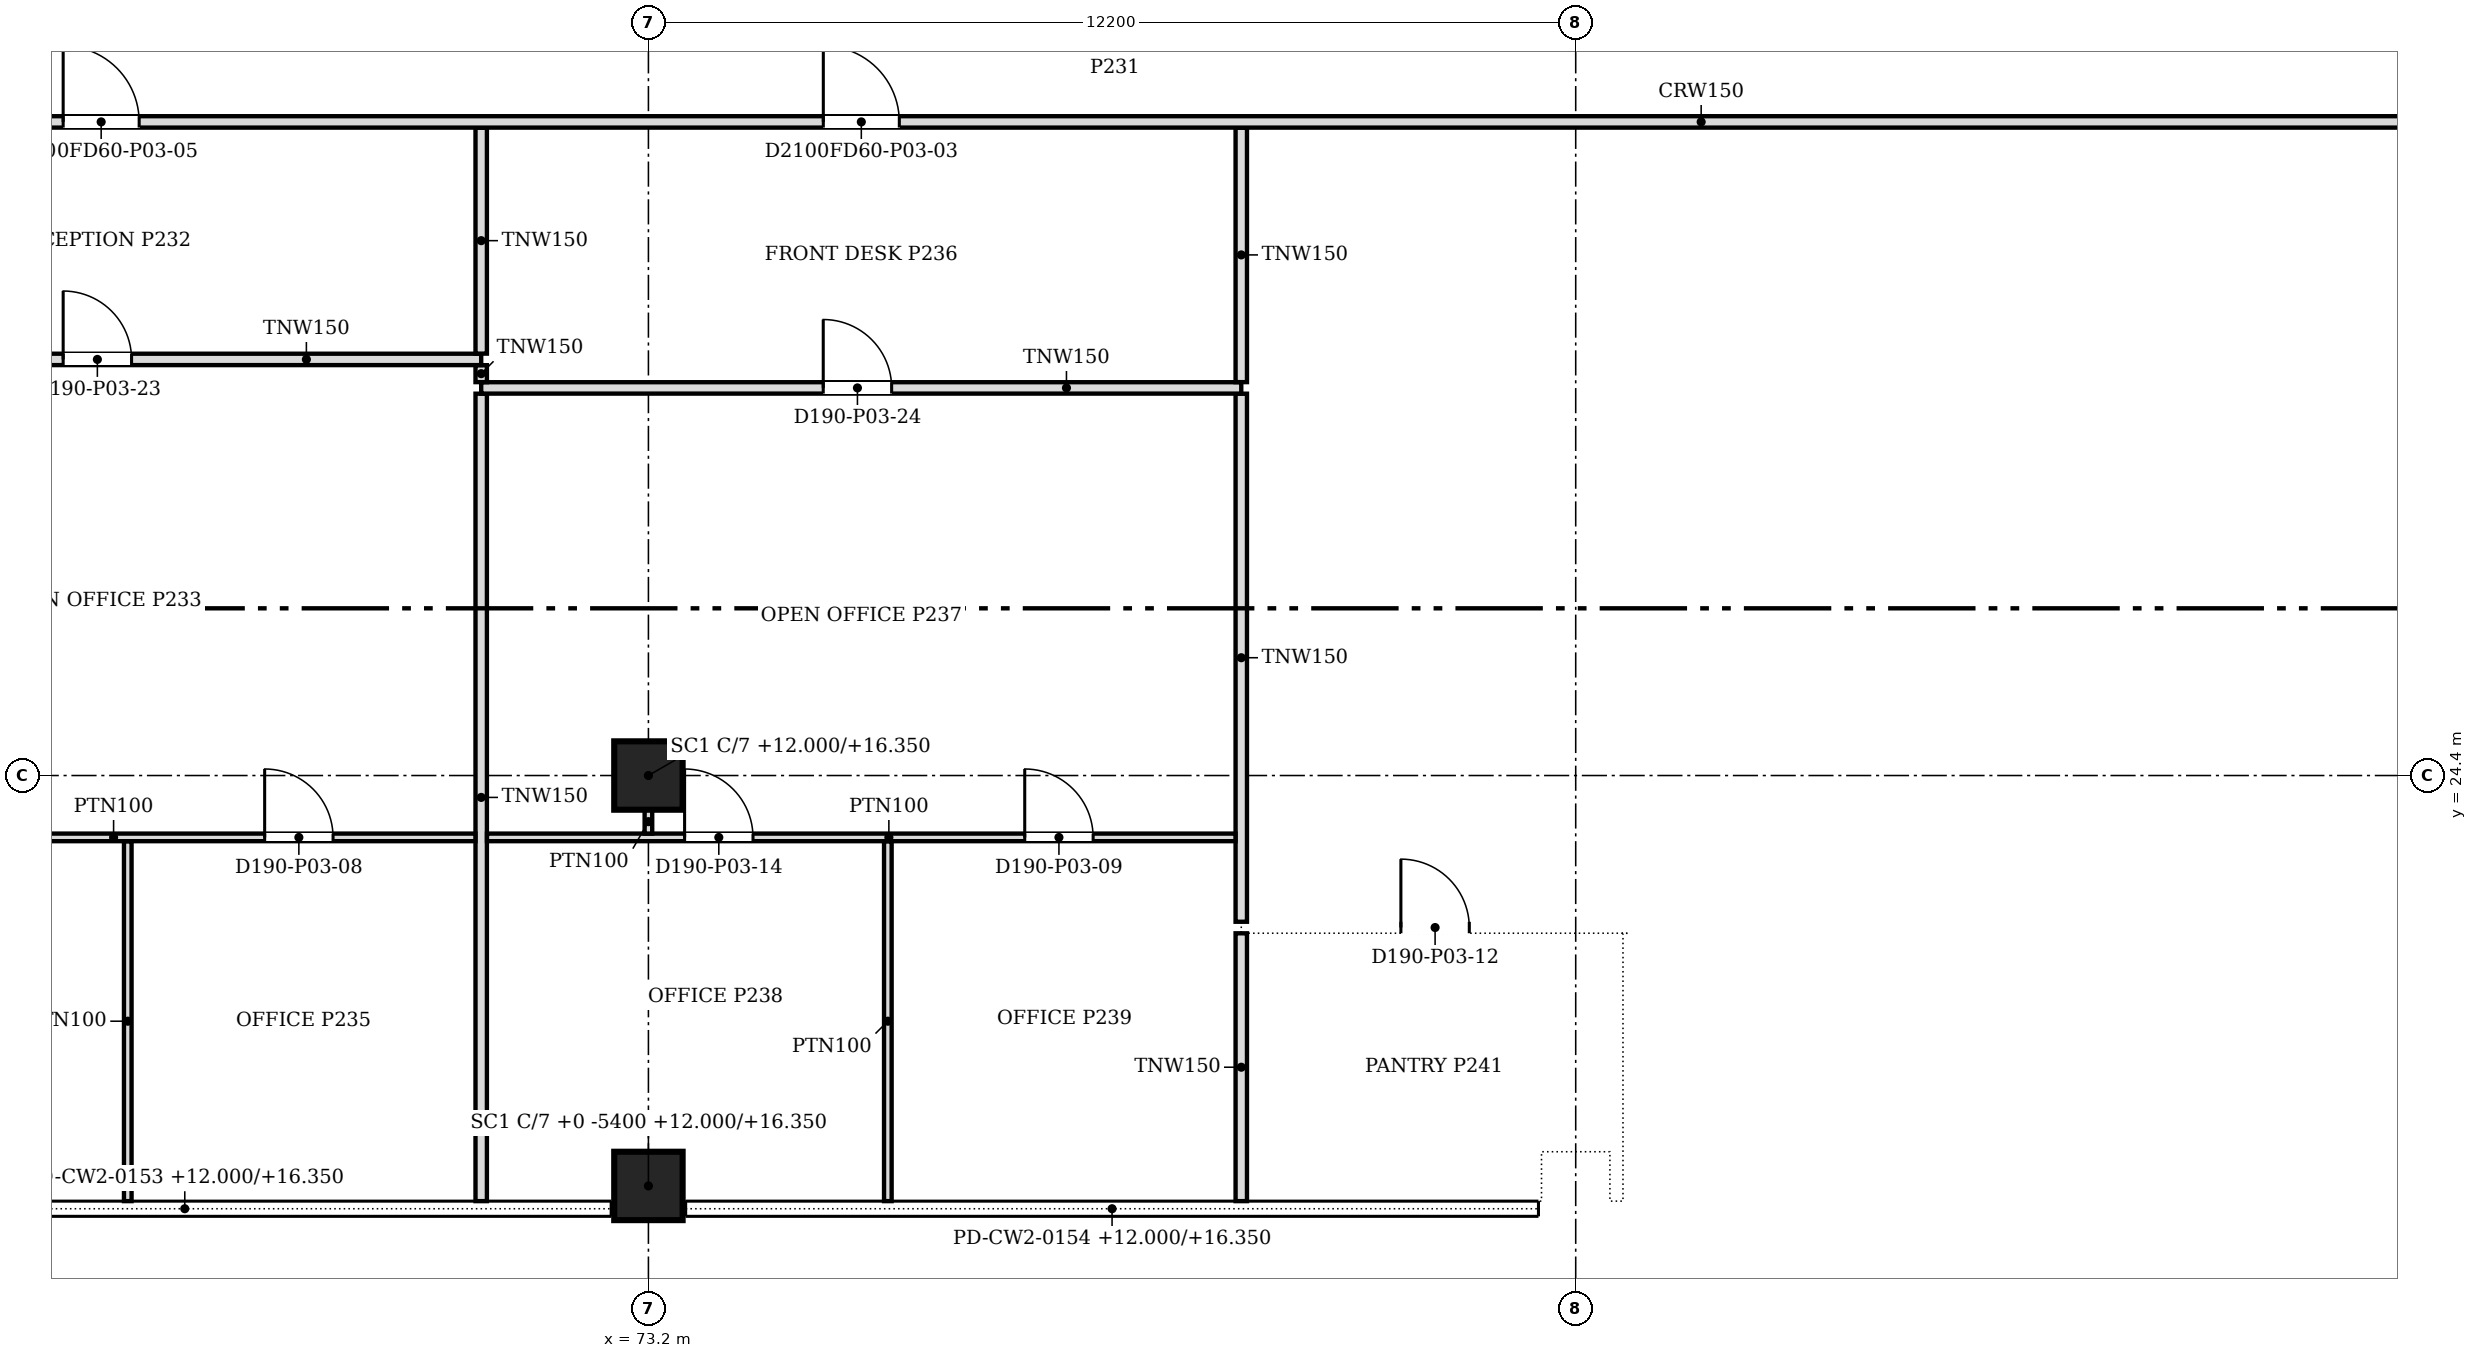
"""IFC4 building model, lengths in metres.
Left out: names, types, materials, properties, quantities, classifications, styles, units other than length and angle.
Written with IfcOpenShell. Run it as: python <this file> out.ifc"""

import sys

from ifc_helpers import new_model, si_unit, direction, frame, frame_2d, origin, origin_2d, place, context, subcontext, project, spatial, rectangle, extrude, source, transform, mapped, element, fill, save


model = new_model("IFC4")
c1 = context("Model", 3, precision=1e-05, world=origin(), true_north=direction((0.0, 1.0)))
c2 = subcontext(c1, "Body", "Model", "MODEL_VIEW")
j1 = project(units=[si_unit("LENGTHUNIT", "METRE"), si_unit("PLANEANGLEUNIT", "RADIAN")], contexts=[c1])
p1 = place(None, origin())
s1 = spatial("IfcSite", under=j1, at=p1, CompositionType="ELEMENT")
p2 = place(p1, origin())
s2 = spatial("IfcBuilding", under=s1, at=p2, CompositionType="ELEMENT")
p3 = place(p2, frame((0.0, 0.0, 12.0)))
s3 = spatial("IfcBuildingStorey", under=s2, at=p3, CompositionType="ELEMENT", Elevation=12.0)
for number, where, z_axis, x_axis in (
    (1, (85.65, 24.4, 0.0), (0.0, 0.0, 1.0), (1.0, 0.0, 0.0)),
    (2, (86.731, 21.644, 0.0), (0.0, 0.0, 1.0), (1.0, 0.0, 0.0)),
    (3, (88.831, 19.574, 0.0), (0.0, 0.0, 1.0), (1.0, 0.0, 0.0)),
):
    element("IfcColumn", number, at=place(p3, frame(where, z_axis=z_axis, x_axis=x_axis)), inside=s3, PredefinedType="COLUMN", context=c2, shape_type="SweptSolid", body=[
        extrude(rectangle(XDim=0.9, YDim=0.9, at=origin_2d()), origin(), (0.0, 0.0, 1.0), 4.6),
    ])
for number, where, z_axis, x_axis in (
    (4, (73.2, 24.4, 0.0), (0.0, 0.0, 1.0), (1.0, 0.0, 0.0)),
    (5, (73.2, 19.0, 0.0), (0.0, 0.0, 1.0), (1.0, 0.0, 0.0)),
    (6, (85.4, 19.0, 0.0), (0.0, 0.0, 1.0), (1.0, 0.0, 0.0)),
):
    element("IfcColumn", number, at=place(p3, frame(where, z_axis=z_axis, x_axis=x_axis)), inside=s3, PredefinedType="COLUMN", context=c2, shape_type="SweptSolid", body=[
        extrude(rectangle(XDim=0.9, YDim=0.9, at=origin_2d()), origin(), (0.0, 0.0, 1.0), 4.35),
    ])
p4 = place(p3, frame((66.35, 18.8, 0.0), z_axis=(0.0, 0.0, 1.0), x_axis=(0.0, 1.0, 0.0)))
e7 = element("IfcWall", 7, at=p4, inside=s3, PredefinedType="PARTITIONING", context=c2, shape_type="SweptSolid", body=[
    extrude(rectangle(XDim=4.735, YDim=0.1, at=frame_2d((2.367, 0.0))), origin(), (0.0, 0.0, 1.0), 3.672),
])
p5 = place(p3, frame((71.0, 18.8, 0.0), z_axis=(0.0, 0.0, 1.0), x_axis=(0.0, 1.0, 0.0)))
e8 = element("IfcWall", 8, at=p5, inside=s3, PredefinedType="PARTITIONING", context=c2, shape_type="SweptSolid", body=[
    extrude(rectangle(XDim=10.624, YDim=0.15, at=frame_2d((5.312, 0.0))), origin(), (0.0, 0.0, 1.0), 3.672),
])
p6 = place(p3, frame((76.35, 18.8, 0.0), z_axis=(0.0, 0.0, 1.0), x_axis=(0.0, 1.0, 0.0)))
e9 = element("IfcWall", 9, at=p6, inside=s3, PredefinedType="PARTITIONING", context=c2, shape_type="SweptSolid", body=[
    extrude(rectangle(XDim=4.735, YDim=0.1, at=frame_2d((2.367, 0.0))), origin(), (0.0, 0.0, 1.0), 3.672),
])
p7 = place(p3, frame((81.0, 18.8, 0.0), z_axis=(0.0, 0.0, 1.0), x_axis=(0.0, 1.0, 0.0)))
e10 = element("IfcWall", 10, at=p7, inside=s3, PredefinedType="PARTITIONING", context=c2, shape_type="SweptSolid", body=[
    extrude(rectangle(XDim=3.524, YDim=0.15, at=frame_2d((1.762, 0.0))), origin(), (0.0, 0.0, 1.0), 3.672),
])
p8 = place(p3, frame((86.072, 18.8, 0.0), z_axis=(0.0, 0.0, 1.0), x_axis=(0.0, 1.0, 0.0)))
e11 = element("IfcWall", 11, at=p8, inside=s3, PredefinedType="PARTITIONING", context=c2, shape_type="SweptSolid", body=[
    extrude(rectangle(XDim=3.524, YDim=0.1, at=frame_2d((1.762, 0.0))), origin(), (0.0, 0.0, 1.0), 3.672),
])
p9 = place(p3, frame((91.5, 18.8, 0.0), z_axis=(0.0, 0.0, 1.0), x_axis=(0.0, 1.0, 0.0)))
e12 = element("IfcWall", 12, at=p9, inside=s3, PredefinedType="PARTITIONING", context=c2, shape_type="SweptSolid", body=[
    extrude(rectangle(XDim=3.524, YDim=0.15, at=frame_2d((1.762, 0.0))), origin(), (0.0, 0.0, 1.0), 3.672),
])
m1 = source(origin(), c2, "Body", "SweptSolid", [
    extrude(rectangle(XDim=0.9, YDim=2.1, at=frame_2d((0.45, 1.05))), frame((0.0, 0.085, 0.0), z_axis=(0.0, -1.0, 0.0), x_axis=(1.0, 0.0, 0.0)), (0.0, 0.0, 1.0), 0.17),
])
p10 = place(p9, frame((1.3, 0.0, 0.0)))
e13 = element("IfcOpeningElement", 13, at=p10, cuts=e12, PredefinedType="OPENING", context=c2, shape_type="MappedRepresentation", body=[
    mapped(m1, transform((0.0, 0.0, 0.0), scale=1.0)),
])
p11 = place(p3, frame((95.2, 18.8, 0.0), z_axis=(0.0, 0.0, 1.0), x_axis=(0.0, 1.0, 0.0)))
e14 = element("IfcWall", 14, at=p11, inside=s3, PredefinedType="PARTITIONING", context=c2, shape_type="SweptSolid", body=[
    extrude(rectangle(XDim=12.124, YDim=0.15, at=frame_2d((6.062, 0.0))), origin(), (0.0, 0.0, 1.0), 3.672),
])
p12 = place(p3, frame((88.831, 19.124, 0.0), z_axis=(0.0, 0.0, 1.0), x_axis=(0.0, -1.0, 0.0)))
e15 = element("IfcWall", 15, at=p12, inside=s3, PredefinedType="PARTITIONING", context=c2, shape_type="SweptSolid", body=[
    extrude(rectangle(XDim=0.374, YDim=0.1, at=frame_2d((0.187, 0.0))), origin(), (0.0, 0.0, 1.0), 3.672),
])
p13 = place(p3, frame((91.5, 22.4, 0.0), z_axis=(0.0, 0.0, 1.0), x_axis=(-1.0, 0.0, 0.0)))
e16 = element("IfcWall", 16, at=p13, inside=s3, PredefinedType="PARTITIONING", context=c2, shape_type="SweptSolid", body=[
    extrude(rectangle(XDim=10.5, YDim=0.15, at=frame_2d((5.25, 0.0))), origin(), (0.0, 0.0, 1.0), 3.672),
])
p14 = place(p13, frame((7.5, 0.0, 0.0)))
e17 = element("IfcOpeningElement", 17, at=p14, cuts=e16, PredefinedType="OPENING", context=c2, shape_type="MappedRepresentation", body=[
    mapped(m1, transform((0.0, 0.0, 0.0), scale=1.0)),
])
p15 = place(p3, frame((81.0, 22.476, 0.0), z_axis=(0.0, 0.0, 1.0), x_axis=(0.0, 1.0, 0.0)))
e18 = element("IfcWall", 18, at=p15, inside=s3, PredefinedType="PARTITIONING", context=c2, shape_type="SweptSolid", body=[
    extrude(rectangle(XDim=6.948, YDim=0.15, at=frame_2d((3.474, 0.0))), origin(), (0.0, 0.0, 1.0), 3.672),
])
p16 = place(p3, frame((70.924, 23.586, 0.0), z_axis=(0.0, 0.0, 1.0), x_axis=(-1.0, 0.0, 0.0)))
e19 = element("IfcWall", 19, at=p16, inside=s3, PredefinedType="PARTITIONING", context=c2, shape_type="SweptSolid", body=[
    extrude(rectangle(XDim=9.848, YDim=0.1, at=frame_2d((4.924, 0.0))), origin(), (0.0, 0.0, 1.0), 3.672),
])
m2 = source(origin(), c2, "Body", "SweptSolid", [
    extrude(rectangle(XDim=0.9, YDim=2.1, at=frame_2d((0.45, 1.05))), frame((0.0, 0.06, 0.0), z_axis=(0.0, -1.0, 0.0), x_axis=(1.0, 0.0, 0.0)), (0.0, 0.0, 1.0), 0.12),
])
p17 = place(p16, frame((1.873, 0.0, 0.0)))
e20 = element("IfcOpeningElement", 20, at=p17, cuts=e19, PredefinedType="OPENING", context=c2, shape_type="MappedRepresentation", body=[
    mapped(m2, transform((0.0, 0.0, 0.0), scale=1.0)),
])
p18 = place(p16, frame((6.748, 0.0, 0.0)))
e21 = element("IfcOpeningElement", 21, at=p18, cuts=e19, PredefinedType="OPENING", context=c2, shape_type="MappedRepresentation", body=[
    mapped(m2, transform((0.0, 0.0, 0.0), scale=1.0)),
])
p19 = place(p3, frame((80.924, 23.586, 0.0), z_axis=(0.0, 0.0, 1.0), x_axis=(-1.0, 0.0, 0.0)))
e22 = element("IfcWall", 22, at=p19, inside=s3, PredefinedType="PARTITIONING", context=c2, shape_type="SweptSolid", body=[
    extrude(rectangle(XDim=9.848, YDim=0.1, at=frame_2d((4.924, 0.0))), origin(), (0.0, 0.0, 1.0), 3.672),
])
p20 = place(p19, frame((1.873, 0.0, 0.0)))
e23 = element("IfcOpeningElement", 23, at=p20, cuts=e22, PredefinedType="OPENING", context=c2, shape_type="MappedRepresentation", body=[
    mapped(m2, transform((0.0, 0.0, 0.0), scale=1.0)),
])
p21 = place(p19, frame((6.348, 0.0, 0.0)))
e24 = element("IfcOpeningElement", 24, at=p21, cuts=e22, PredefinedType="OPENING", context=c2, shape_type="MappedRepresentation", body=[
    mapped(m2, transform((0.0, 0.0, 0.0), scale=1.0)),
])
p22 = place(p3, frame((73.2, 23.95, 0.0), z_axis=(0.0, 0.0, 1.0), x_axis=(0.0, -1.0, 0.0)))
e25 = element("IfcWall", 25, at=p22, inside=s3, PredefinedType="PARTITIONING", context=c2, shape_type="SweptSolid", body=[
    extrude(rectangle(XDim=0.314, YDim=0.1, at=frame_2d((0.157, 0.0))), origin(), (0.0, 0.0, 1.0), 3.672),
])
p23 = place(p3, frame((97.149, 24.4, 0.0), z_axis=(0.0, 0.0, 1.0), x_axis=(-1.0, 0.0, 0.0)))
e26 = element("IfcWall", 26, at=p23, inside=s3, PredefinedType="PARTITIONING", context=c2, shape_type="SweptSolid", body=[
    extrude(rectangle(XDim=1.873, YDim=0.1, at=frame_2d((0.937, 0.0))), origin(), (0.0, 0.0, 1.0), 3.672),
])
p24 = place(p23, frame((0.473, 0.0, 0.0)))
e27 = element("IfcOpeningElement", 27, at=p24, cuts=e26, PredefinedType="OPENING", context=c2, shape_type="MappedRepresentation", body=[
    mapped(m2, transform((0.0, 0.0, 0.0), scale=1.0)),
])
p25 = place(p3, frame((81.0, 29.5, 0.0), z_axis=(0.0, 0.0, 1.0), x_axis=(-1.0, 0.0, 0.0)))
e28 = element("IfcWall", 28, at=p25, inside=s3, PredefinedType="PARTITIONING", context=c2, shape_type="SweptSolid", body=[
    extrude(rectangle(XDim=10.0, YDim=0.15, at=frame_2d((5.0, 0.0))), origin(), (0.0, 0.0, 1.0), 3.672),
])
p26 = place(p25, frame((4.6, 0.0, 0.0)))
e29 = element("IfcOpeningElement", 29, at=p26, cuts=e28, PredefinedType="OPENING", context=c2, shape_type="MappedRepresentation", body=[
    mapped(m1, transform((0.0, 0.0, 0.0), scale=1.0)),
])
p27 = place(p3, frame((71.0, 29.576, 0.0), z_axis=(0.0, 0.0, 1.0), x_axis=(0.0, 1.0, 0.0)))
e30 = element("IfcWall", 30, at=p27, inside=s3, PredefinedType="PARTITIONING", context=c2, shape_type="SweptSolid", body=[
    extrude(rectangle(XDim=0.223, YDim=0.15, at=frame_2d((0.112, 0.0))), origin(), (0.0, 0.0, 1.0), 3.672),
])
p28 = place(p3, frame((81.0, 29.576, 0.0), z_axis=(0.0, 0.0, 1.0), x_axis=(0.0, 1.0, 0.0)))
e31 = element("IfcWall", 31, at=p28, inside=s3, PredefinedType="PARTITIONING", context=c2, shape_type="SweptSolid", body=[
    extrude(rectangle(XDim=3.348, YDim=0.15, at=frame_2d((1.674, 0.0))), origin(), (0.0, 0.0, 1.0), 3.672),
])
p29 = place(p3, frame((71.0, 29.875, 0.0), z_axis=(0.0, 0.0, 1.0), x_axis=(-1.0, 0.0, 0.0)))
e32 = element("IfcWall", 32, at=p29, inside=s3, PredefinedType="PARTITIONING", context=c2, shape_type="SweptSolid", body=[
    extrude(rectangle(XDim=10.0, YDim=0.15, at=frame_2d((5.0, 0.0))), origin(), (0.0, 0.0, 1.0), 3.672),
])
p30 = place(p29, frame((4.6, 0.0, 0.0)))
e33 = element("IfcOpeningElement", 33, at=p30, cuts=e32, PredefinedType="OPENING", context=c2, shape_type="MappedRepresentation", body=[
    mapped(m1, transform((0.0, 0.0, 0.0), scale=1.0)),
])
p31 = place(p3, frame((71.0, 29.951, 0.0), z_axis=(0.0, 0.0, 1.0), x_axis=(0.0, 1.0, 0.0)))
e34 = element("IfcWall", 34, at=p31, inside=s3, PredefinedType="PARTITIONING", context=c2, shape_type="SweptSolid", body=[
    extrude(rectangle(XDim=2.973, YDim=0.15, at=frame_2d((1.487, 0.0))), origin(), (0.0, 0.0, 1.0), 3.672),
])
p32 = place(p3, frame((105.2, 31.0, 0.0), z_axis=(0.0, 0.0, 1.0), x_axis=(-1.0, 0.0, 0.0)))
e35 = element("IfcWall", 35, at=p32, inside=s3, PredefinedType="PARTITIONING", context=c2, shape_type="SweptSolid", body=[
    extrude(rectangle(XDim=10.0, YDim=0.15, at=frame_2d((5.0, 0.0))), origin(), (0.0, 0.0, 1.0), 3.672),
])
p33 = place(p32, frame((4.6, 0.0, 0.0)))
e36 = element("IfcOpeningElement", 36, at=p33, cuts=e35, PredefinedType="OPENING", context=c2, shape_type="MappedRepresentation", body=[
    mapped(m1, transform((0.0, 0.0, 0.0), scale=1.0)),
])
p34 = place(p3, frame((95.2, 31.076, 0.0), z_axis=(0.0, 0.0, 1.0), x_axis=(0.0, 1.0, 0.0)))
e37 = element("IfcWall", 37, at=p34, inside=s3, PredefinedType="PARTITIONING", context=c2, shape_type="SweptSolid", body=[
    extrude(rectangle(XDim=1.848, YDim=0.15, at=frame_2d((0.924, 0.0))), origin(), (0.0, 0.0, 1.0), 3.672),
])
p35 = place(p3, frame((97.6, 33.0, 0.0), z_axis=(0.0, 0.0, 1.0), x_axis=(-1.0, 0.0, 0.0)))
e38 = element("IfcWall", 38, at=p35, inside=s3, PredefinedType="PARTITIONING", context=c2, shape_type="SweptSolid", body=[
    extrude(rectangle(XDim=36.6, YDim=0.15, at=frame_2d((18.3, 0.0))), origin(), (0.0, 0.0, 1.0), 3.672),
])
m3 = source(origin(), c2, "Body", "SweptSolid", [
    extrude(rectangle(XDim=1.0, YDim=2.1, at=frame_2d((0.5, 1.05))), frame((0.0, 0.085, 0.0), z_axis=(0.0, -1.0, 0.0), x_axis=(1.0, 0.0, 0.0)), (0.0, 0.0, 1.0), 0.17),
])
p36 = place(p35, frame((21.099, 0.0, 0.0)))
e39 = element("IfcOpeningElement", 39, at=p36, cuts=e38, PredefinedType="OPENING", context=c2, shape_type="MappedRepresentation", body=[
    mapped(m3, transform((0.0, 0.0, 0.0), scale=1.0)),
])
p37 = place(p35, frame((31.1, 0.0, 0.0)))
e40 = element("IfcOpeningElement", 40, at=p37, cuts=e38, PredefinedType="OPENING", context=c2, shape_type="MappedRepresentation", body=[
    mapped(m3, transform((0.0, 0.0, 0.0), scale=1.0)),
])
p38 = place(p35, frame((9.0, 0.0, 0.0)))
e41 = element("IfcOpeningElement", 41, at=p38, cuts=e38, PredefinedType="OPENING", context=c2, shape_type="MappedRepresentation", body=[
    mapped(m3, transform((0.0, 0.0, 0.0), scale=1.0)),
])
m4 = source(origin(), c2, "Body", "SweptSolid", [
    extrude(rectangle(XDim=0.9, YDim=2.1, at=frame_2d((0.45, 1.05))), frame((0.0, 0.025, 0.0), z_axis=(0.0, -1.0, 0.0), x_axis=(1.0, 0.0, 0.0)), (0.0, 0.0, 1.0), 0.05),
])
p39 = place(p24, origin())
e42 = element("IfcDoor", 42, at=p39, inside=s3, OperationType="SINGLE_SWING_RIGHT", PredefinedType="DOOR", context=c2, shape_type="MappedRepresentation", body=[
    mapped(m4, transform((0.0, 0.0, 0.0), scale=1.0)),
])
fill(e27, e42)
p40 = place(p17, origin())
e43 = element("IfcDoor", 43, at=p40, inside=s3, OperationType="SINGLE_SWING_RIGHT", PredefinedType="DOOR", context=c2, shape_type="MappedRepresentation", body=[
    mapped(m4, transform((0.0, 0.0, 0.0), scale=1.0)),
])
fill(e20, e43)
p41 = place(p20, origin())
e44 = element("IfcDoor", 44, at=p41, inside=s3, OperationType="SINGLE_SWING_RIGHT", PredefinedType="DOOR", context=c2, shape_type="MappedRepresentation", body=[
    mapped(m4, transform((0.0, 0.0, 0.0), scale=1.0)),
])
fill(e23, e44)
p42 = place(p14, origin())
e45 = element("IfcDoor", 45, at=p42, inside=s3, OperationType="SINGLE_SWING_RIGHT", PredefinedType="DOOR", context=c2, shape_type="MappedRepresentation", body=[
    mapped(m4, transform((0.0, 0.0, 0.0), scale=1.0)),
])
fill(e17, e45)
p43 = place(p21, origin())
e46 = element("IfcDoor", 46, at=p43, inside=s3, OperationType="SINGLE_SWING_RIGHT", PredefinedType="DOOR", context=c2, shape_type="MappedRepresentation", body=[
    mapped(m4, transform((0.0, 0.0, 0.0), scale=1.0)),
])
fill(e24, e46)
p44 = place(p10, origin())
e47 = element("IfcDoor", 47, at=p44, inside=s3, OperationType="SINGLE_SWING_LEFT", PredefinedType="DOOR", context=c2, shape_type="MappedRepresentation", body=[
    mapped(m4, transform((0.0, 0.0, 0.0), scale=1.0)),
])
fill(e13, e47)
m5 = source(origin(), c2, "Body", "SweptSolid", [
    extrude(rectangle(XDim=1.0, YDim=2.1, at=frame_2d((0.5, 1.05))), frame((0.0, 0.025, 0.0), z_axis=(0.0, -1.0, 0.0), x_axis=(1.0, 0.0, 0.0)), (0.0, 0.0, 1.0), 0.05),
])
p45 = place(p36, origin())
e48 = element("IfcDoor", 48, at=p45, inside=s3, OperationType="SINGLE_SWING_RIGHT", PredefinedType="DOOR", context=c2, shape_type="MappedRepresentation", body=[
    mapped(m5, transform((0.0, 0.0, 0.0), scale=1.0)),
])
fill(e39, e48)
p46 = place(p37, origin())
e49 = element("IfcDoor", 49, at=p46, inside=s3, OperationType="SINGLE_SWING_RIGHT", PredefinedType="DOOR", context=c2, shape_type="MappedRepresentation", body=[
    mapped(m5, transform((0.0, 0.0, 0.0), scale=1.0)),
])
fill(e40, e49)
p47 = place(p30, origin())
e50 = element("IfcDoor", 50, at=p47, inside=s3, OperationType="SINGLE_SWING_RIGHT", PredefinedType="DOOR", context=c2, shape_type="MappedRepresentation", body=[
    mapped(m4, transform((0.0, 0.0, 0.0), scale=1.0)),
])
fill(e33, e50)
p48 = place(p26, origin())
e51 = element("IfcDoor", 51, at=p48, inside=s3, OperationType="SINGLE_SWING_RIGHT", PredefinedType="DOOR", context=c2, shape_type="MappedRepresentation", body=[
    mapped(m4, transform((0.0, 0.0, 0.0), scale=1.0)),
])
fill(e29, e51)
p49 = place(p38, origin())
e52 = element("IfcDoor", 52, at=p49, inside=s3, OperationType="SINGLE_SWING_RIGHT", PredefinedType="DOOR", context=c2, shape_type="MappedRepresentation", body=[
    mapped(m5, transform((0.0, 0.0, 0.0), scale=1.0)),
])
fill(e41, e52)
save(model, sys.argv[1])
